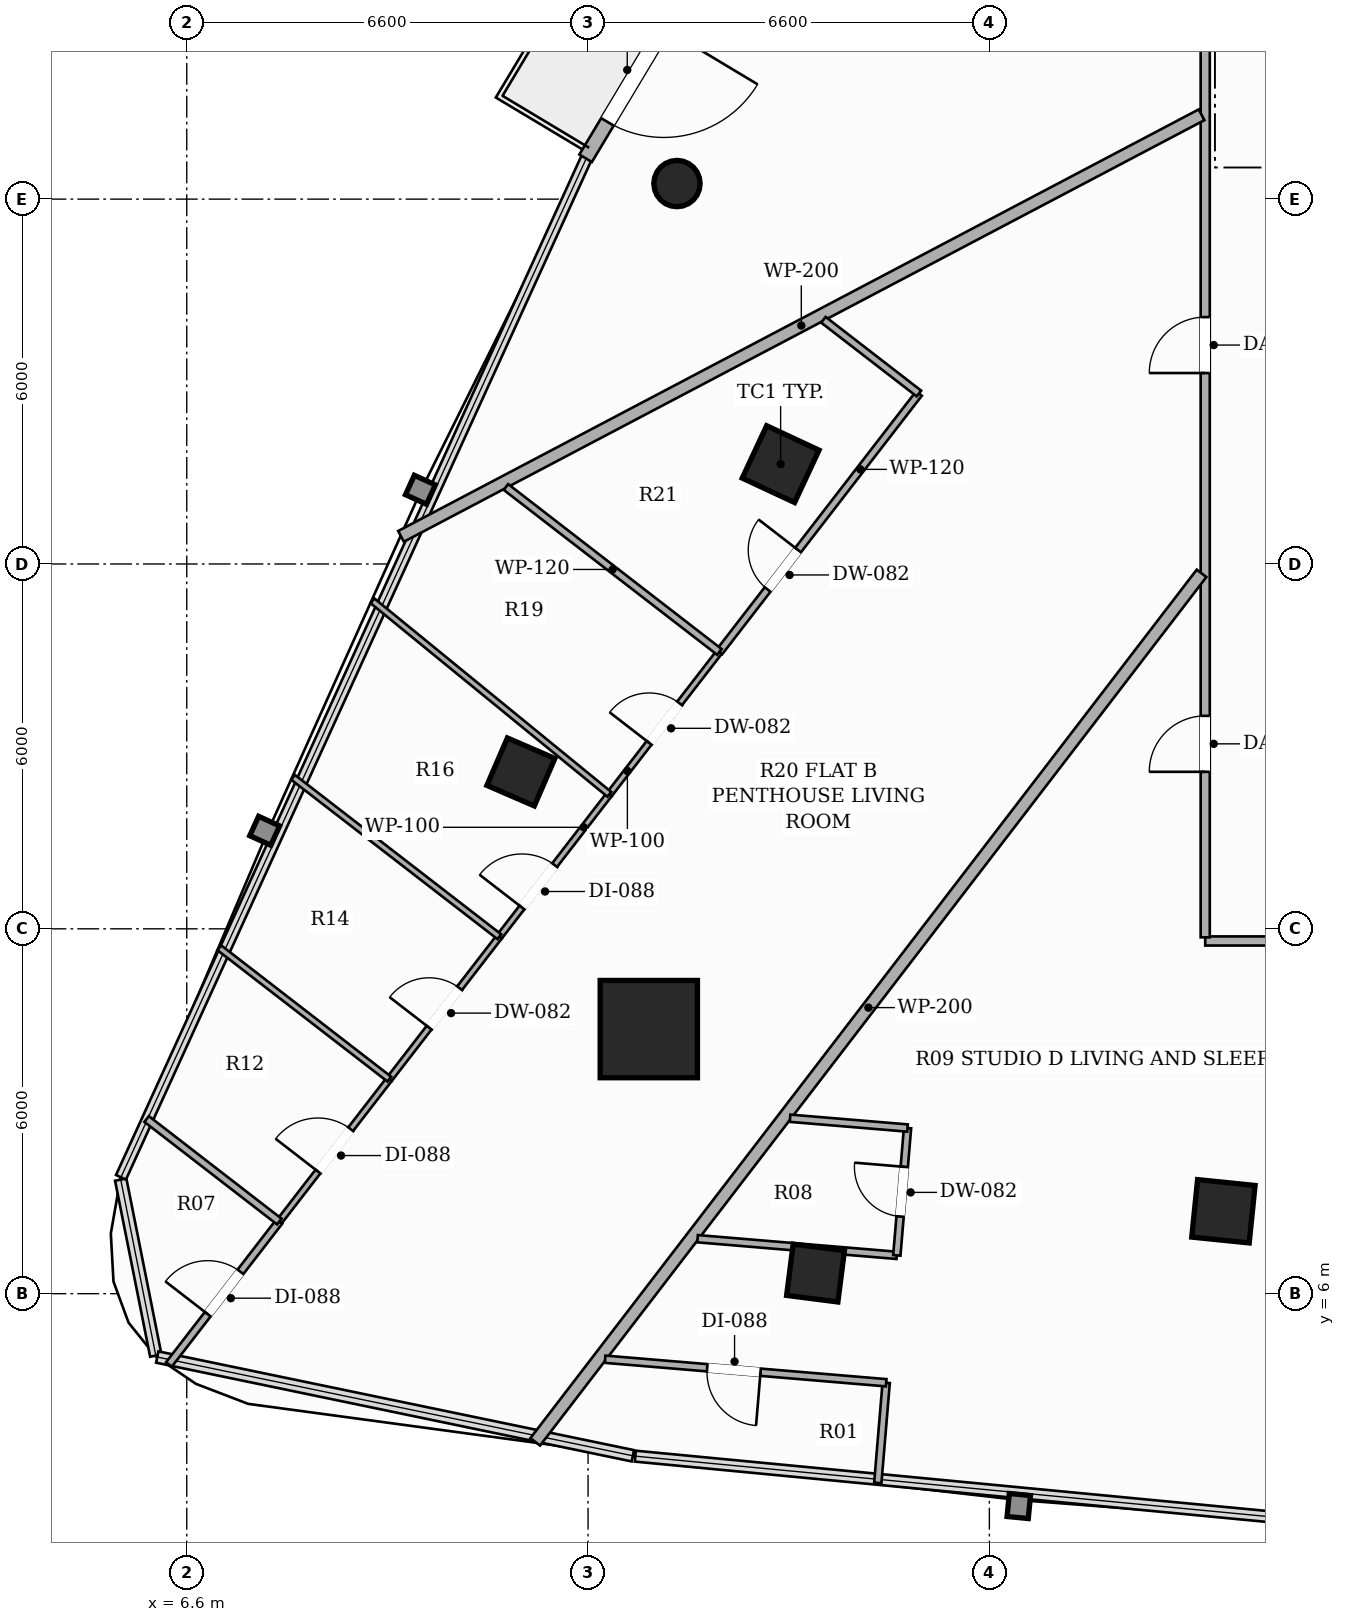
"""IFC4 building model, lengths in metres.
Left out: names, types, materials, properties, quantities, classifications, styles, units other than length and angle.
Written with IfcOpenShell. Run it as: python <this file> out.ifc"""

import sys

from ifc_helpers import new_model, si_unit, direction, frame, frame_2d, origin, origin_2d, place, context, subcontext, project, spatial, rectangle, hollow_rectangle, hollow_circle, extrude, element, fill, save


model = new_model("IFC4")
c1 = context("Model", 3, precision=1e-05, world=origin(), true_north=direction((0.0, 1.0)))
c2 = subcontext(c1, "Body", "Model", "MODEL_VIEW")
j1 = project(units=[si_unit("LENGTHUNIT", "METRE"), si_unit("PLANEANGLEUNIT", "RADIAN")], contexts=[c1])
p1 = place(None, origin())
s1 = spatial("IfcSite", under=j1, at=p1, CompositionType="ELEMENT")
p2 = place(p1, origin())
s2 = spatial("IfcBuilding", under=s1, at=p2, CompositionType="ELEMENT")
p3 = place(p2, frame((0.0, 0.0, 77.45)))
s3 = spatial("IfcBuildingStorey", under=s2, at=p3, CompositionType="ELEMENT", Elevation=77.45)
p4 = place(p3, frame((14.199, 10.351, 0.0), z_axis=(0.0, 0.0, 1.0), x_axis=(1.0, 0.0, 0.0)))
e1 = element("IfcColumn", 1, at=p4, inside=s3, PredefinedType="COLUMN", context=c2, shape_type="SweptSolid", body=[
    extrude(hollow_rectangle(XDim=1.6, YDim=1.6, WallThickness=0.05, at=origin_2d()), origin(), (0.0, 0.0, 1.0), 3.3),
])
for number, where, z_axis, x_axis in (
    (2, (16.367, 19.642, 0.0), (0.0, 0.0, 1.0), (0.423, 0.906, 0.0)),
    (3, (23.649, 7.355, 0.0), (0.0, 0.0, 1.0), (-0.995, 0.101, 0.0)),
):
    element("IfcColumn", number, at=place(p3, frame(where, z_axis=z_axis, x_axis=x_axis)), inside=s3, PredefinedType="COLUMN", context=c2, shape_type="SweptSolid", body=[
        extrude(hollow_rectangle(XDim=0.95, YDim=0.95, WallThickness=0.032, at=origin_2d()), origin(), (0.0, 0.0, 1.0), 3.3),
    ])
for number, where, z_axis, x_axis in (
    (4, (12.095, 14.58, 0.0), (0.0, 0.0, 1.0), (0.397, 0.918, 0.0)),
    (5, (16.941, 6.339, 0.0), (0.0, 0.0, 1.0), (-0.992, 0.127, 0.0)),
):
    element("IfcColumn", number, at=place(p3, frame(where, z_axis=z_axis, x_axis=x_axis)), inside=s3, PredefinedType="COLUMN", context=c2, shape_type="SweptSolid", body=[
        extrude(hollow_rectangle(XDim=0.85, YDim=0.85, WallThickness=0.028, at=origin_2d()), origin(), (0.0, 0.0, 1.0), 3.3),
    ])
p5 = place(p3, frame((14.662, 24.256, 0.0), z_axis=(0.0, 0.0, 1.0), x_axis=(1.0, 0.0, 0.0)))
e6 = element("IfcColumn", 6, at=p5, inside=s3, PredefinedType="COLUMN", context=c2, shape_type="SweptSolid", body=[
    extrude(hollow_circle(Radius=0.381, WallThickness=0.022, at=origin_2d()), origin(), (0.0, 0.0, 1.0), 3.3),
])
p6 = place(p3, frame((19.576, 35.37, 0.0), z_axis=(0.0, 0.0, 1.0), x_axis=(-0.514331693128, -0.85759134175, 0.0)))
e7 = element("IfcWall", 7, at=p6, inside=s3, PredefinedType="SOLIDWALL", context=c2, shape_type="SweptSolid", body=[
    extrude(rectangle(XDim=12.474, YDim=0.24, at=frame_2d((6.237, 0.0))), origin(), (0.0, 0.0, 1.0), 2.624),
])
p7 = place(p6, frame((9.977, 0.0, 0.0)))
e8 = element("IfcOpeningElement", 8, at=p7, cuts=e7, PredefinedType="OPENING", context=c2, shape_type="SweptSolid", body=[
    extrude(rectangle(XDim=1.8, YDim=2.2, at=frame_2d((0.9, 1.1))), frame((0.0, 0.13, 0.0), z_axis=(0.0, -1.0, 0.0), x_axis=(1.0, 0.0, 0.0)), (0.0, 0.0, 1.0), 0.26),
])
p8 = place(p3, frame((42.59, 11.8, 0.0), z_axis=(0.0, 0.0, 1.0), x_axis=(-1.0, 0.0, 0.0)))
e9 = element("IfcWall", 9, at=p8, inside=s3, PredefinedType="PARTITIONING", context=c2, shape_type="SweptSolid", body=[
    extrude(rectangle(XDim=19.24, YDim=0.15, at=frame_2d((9.62, 0.0))), origin(), (0.0, 0.0, 1.0), 2.669),
])
p9 = place(p8, frame((9.24, 0.0, 0.0)))
e10 = element("IfcOpeningElement", 10, at=p9, cuts=e9, PredefinedType="OPENING", context=c2, shape_type="SweptSolid", body=[
    extrude(rectangle(XDim=0.88, YDim=2.1, at=frame_2d((0.44, 1.05))), frame((0.0, 0.085, 0.0), z_axis=(0.0, -1.0, 0.0), x_axis=(1.0, 0.0, 0.0)), (0.0, 0.0, 1.0), 0.17),
])
p10 = place(p8, frame((2.174, 0.0, 0.0)))
e11 = element("IfcOpeningElement", 11, at=p10, cuts=e9, PredefinedType="OPENING", context=c2, shape_type="SweptSolid", body=[
    extrude(rectangle(XDim=0.88, YDim=2.1, at=frame_2d((0.44, 1.05))), frame((0.0, 0.085, 0.0), z_axis=(0.0, -1.0, 0.0), x_axis=(1.0, 0.0, 0.0)), (0.0, 0.0, 1.0), 0.17),
])
p11 = place(p3, frame((23.35, 11.86, 0.0), z_axis=(0.0, 0.0, 1.0), x_axis=(0.0, 1.0, 0.0)))
e12 = element("IfcWall", 12, at=p11, inside=s3, PredefinedType="PARTITIONING", context=c2, shape_type="SweptSolid", body=[
    extrude(rectangle(XDim=25.04, YDim=0.15, at=frame_2d((12.52, 0.0))), origin(), (0.0, 0.0, 1.0), 2.413),
])
p12 = place(p11, frame((18.695, 0.0, 0.0)))
e13 = element("IfcOpeningElement", 13, at=p12, cuts=e12, PredefinedType="OPENING", context=c2, shape_type="SweptSolid", body=[
    extrude(rectangle(XDim=0.88, YDim=2.1, at=frame_2d((0.44, 1.05))), frame((0.0, 0.085, 0.0), z_axis=(0.0, -1.0, 0.0), x_axis=(1.0, 0.0, 0.0)), (0.0, 0.0, 1.0), 0.17),
])
p13 = place(p11, frame((9.28, 0.0, 0.0)))
e14 = element("IfcOpeningElement", 14, at=p13, cuts=e12, PredefinedType="OPENING", context=c2, shape_type="SweptSolid", body=[
    extrude(rectangle(XDim=0.92, YDim=2.15, at=frame_2d((0.46, 1.075))), frame((0.0, 0.085, 0.0), z_axis=(0.0, -1.0, 0.0), x_axis=(1.0, 0.0, 0.0)), (0.0, 0.0, 1.0), 0.17),
])
p14 = place(p11, frame((2.722, 0.0, 0.0)))
e15 = element("IfcOpeningElement", 15, at=p14, cuts=e12, PredefinedType="OPENING", context=c2, shape_type="SweptSolid", body=[
    extrude(rectangle(XDim=0.92, YDim=2.15, at=frame_2d((0.46, 1.075))), frame((0.0, 0.085, 0.0), z_axis=(0.0, -1.0, 0.0), x_axis=(1.0, 0.0, 0.0)), (0.0, 0.0, 1.0), 0.17),
])
p15 = place(p3, frame((23.29, 25.387, 0.0), z_axis=(0.0, 0.0, 1.0), x_axis=(-0.884824599801, -0.465924272373, 0.0)))
e16 = element("IfcWall", 16, at=p15, inside=s3, PredefinedType="PARTITIONING", context=c2, shape_type="SweptSolid", body=[
    extrude(rectangle(XDim=14.88, YDim=0.2, at=frame_2d((7.44, 0.0))), origin(), (0.0, 0.0, 1.0), 2.413),
])
p16 = place(p3, frame((23.29, 17.846, 0.0), z_axis=(0.0, 0.0, 1.0), x_axis=(-0.608736412859, -0.793372535232, 0.0)))
e17 = element("IfcWall", 17, at=p16, inside=s3, PredefinedType="PARTITIONING", context=c2, shape_type="SweptSolid", body=[
    extrude(rectangle(XDim=18.003, YDim=0.2, at=frame_2d((9.001, 0.0))), origin(), (0.0, 0.0, 1.0), 2.413),
])
p17 = place(p3, frame((15.36, 16.554, 0.0), z_axis=(0.0, 0.0, 1.0), x_axis=(0.611289599194, 0.791406991324, 0.0)))
e18 = element("IfcWall", 18, at=p17, inside=s3, PredefinedType="PARTITIONING", context=c2, shape_type="SweptSolid", body=[
    extrude(rectangle(XDim=5.369, YDim=0.12, at=frame_2d((2.685, 0.0))), origin(), (0.0, 0.0, 1.0), 2.669),
])
p18 = place(p17, frame((1.297, 0.0, 0.0)))
e19 = element("IfcOpeningElement", 19, at=p18, cuts=e18, PredefinedType="OPENING", context=c2, shape_type="SweptSolid", body=[
    extrude(rectangle(XDim=0.82, YDim=2.1, at=frame_2d((0.41, 1.05))), frame((0.0, 0.07, 0.0), z_axis=(0.0, -1.0, 0.0), x_axis=(1.0, 0.0, 0.0)), (0.0, 0.0, 1.0), 0.14),
])
p19 = place(p3, frame((18.642, 20.803, 0.0), z_axis=(0.0, 0.0, 1.0), x_axis=(-0.791493240875, 0.611177919799, 0.0)))
e20 = element("IfcWall", 20, at=p19, inside=s3, PredefinedType="PARTITIONING", context=c2, shape_type="SweptSolid", body=[
    extrude(rectangle(XDim=1.985, YDim=0.12, at=frame_2d((0.992, 0.0))), origin(), (0.0, 0.0, 1.0), 2.669),
])
p20 = place(p3, frame((6.307, 4.836, 0.0), z_axis=(0.0, 0.0, 1.0), x_axis=(0.611279012709, 0.791415168304, 0.0)))
e21 = element("IfcWall", 21, at=p20, inside=s3, PredefinedType="PARTITIONING", context=c2, shape_type="SweptSolid", body=[
    extrude(rectangle(XDim=2.969, YDim=0.12, at=frame_2d((1.485, 0.0))), origin(), (0.0, 0.0, 1.0), 3.06),
])
p21 = place(p20, frame((1.045, 0.0, 0.0)))
e22 = element("IfcOpeningElement", 22, at=p21, cuts=e21, PredefinedType="OPENING", context=c2, shape_type="SweptSolid", body=[
    extrude(rectangle(XDim=0.88, YDim=2.1, at=frame_2d((0.44, 1.05))), frame((0.0, 0.07, 0.0), z_axis=(0.0, -1.0, 0.0), x_axis=(1.0, 0.0, 0.0)), (0.0, 0.0, 1.0), 0.14),
])
p22 = place(p3, frame((11.741, 11.87, 0.0), z_axis=(0.0, 0.0, 1.0), x_axis=(0.61134418085, 0.791364828976, 0.0)))
e23 = element("IfcWall", 23, at=p22, inside=s3, PredefinedType="PARTITIONING", context=c2, shape_type="SweptSolid", body=[
    extrude(rectangle(XDim=2.959, YDim=0.1, at=frame_2d((1.479, 0.0))), origin(), (0.0, 0.0, 1.0), 2.413),
])
p23 = place(p22, frame((0.608, 0.0, 0.0)))
e24 = element("IfcOpeningElement", 24, at=p23, cuts=e23, PredefinedType="OPENING", context=c2, shape_type="SweptSolid", body=[
    extrude(rectangle(XDim=0.88, YDim=2.1, at=frame_2d((0.44, 1.05))), frame((0.0, 0.06, 0.0), z_axis=(0.0, -1.0, 0.0), x_axis=(1.0, 0.0, 0.0)), (0.0, 0.0, 1.0), 0.12),
])
p24 = place(p3, frame((13.55, 14.212, 0.0), z_axis=(0.0, 0.0, 1.0), x_axis=(0.611510880037, 0.791236022686, 0.0)))
e25 = element("IfcWall", 25, at=p24, inside=s3, PredefinedType="PARTITIONING", context=c2, shape_type="SweptSolid", body=[
    extrude(rectangle(XDim=2.96, YDim=0.1, at=frame_2d((1.48, 0.0))), origin(), (0.0, 0.0, 1.0), 3.06),
])
p25 = place(p24, frame((1.07, 0.0, 0.0)))
e26 = element("IfcOpeningElement", 26, at=p25, cuts=e25, PredefinedType="OPENING", context=c2, shape_type="SweptSolid", body=[
    extrude(rectangle(XDim=0.82, YDim=2.1, at=frame_2d((0.41, 1.05))), frame((0.0, 0.06, 0.0), z_axis=(0.0, -1.0, 0.0), x_axis=(1.0, 0.0, 0.0)), (0.0, 0.0, 1.0), 0.12),
])
p26 = place(p3, frame((9.932, 9.528, 0.0), z_axis=(0.0, 0.0, 1.0), x_axis=(0.611304268233, 0.791395660615, 0.0)))
e27 = element("IfcWall", 27, at=p26, inside=s3, PredefinedType="PARTITIONING", context=c2, shape_type="SweptSolid", body=[
    extrude(rectangle(XDim=2.959, YDim=0.1, at=frame_2d((1.48, 0.0))), origin(), (0.0, 0.0, 1.0), 2.619),
])
p27 = place(p26, frame((1.07, 0.0, 0.0)))
e28 = element("IfcOpeningElement", 28, at=p27, cuts=e27, PredefinedType="OPENING", context=c2, shape_type="SweptSolid", body=[
    extrude(rectangle(XDim=0.82, YDim=2.1, at=frame_2d((0.41, 1.05))), frame((0.0, 0.06, 0.0), z_axis=(0.0, -1.0, 0.0), x_axis=(1.0, 0.0, 0.0)), (0.0, 0.0, 1.0), 0.12),
])
p28 = place(p3, frame((8.122, 7.186, 0.0), z_axis=(0.0, 0.0, 1.0), x_axis=(0.611459238808, 0.791275931187, 0.0)))
e29 = element("IfcWall", 29, at=p28, inside=s3, PredefinedType="PARTITIONING", context=c2, shape_type="SweptSolid", body=[
    extrude(rectangle(XDim=2.96, YDim=0.1, at=frame_2d((1.48, 0.0))), origin(), (0.0, 0.0, 1.0), 3.06),
])
p29 = place(p28, frame((1.04, 0.0, 0.0)))
e30 = element("IfcOpeningElement", 30, at=p29, cuts=e29, PredefinedType="OPENING", context=c2, shape_type="SweptSolid", body=[
    extrude(rectangle(XDim=0.88, YDim=2.1, at=frame_2d((0.44, 1.05))), frame((0.0, 0.06, 0.0), z_axis=(0.0, -1.0, 0.0), x_axis=(1.0, 0.0, 0.0)), (0.0, 0.0, 1.0), 0.12),
])
p30 = place(p3, frame((15.36, 16.554, 0.0), z_axis=(0.0, 0.0, 1.0), x_axis=(-0.79138059941, 0.611323766, 0.0)))
e31 = element("IfcWall", 31, at=p30, inside=s3, PredefinedType="PARTITIONING", context=c2, shape_type="SweptSolid", body=[
    extrude(rectangle(XDim=4.437, YDim=0.12, at=frame_2d((2.218, 0.0))), origin(), (0.0, 0.0, 1.0), 2.413),
])
p31 = place(p3, frame((5.94, 8.872, 0.0), z_axis=(0.0, 0.0, 1.0), x_axis=(0.791312259297, -0.611412224514, 0.0)))
e32 = element("IfcWall", 32, at=p31, inside=s3, PredefinedType="PARTITIONING", context=c2, shape_type="SweptSolid", body=[
    extrude(rectangle(XDim=2.758, YDim=0.12, at=frame_2d((1.379, 0.0))), origin(), (0.0, 0.0, 1.0), 3.06),
])
p32 = place(p3, frame((9.654, 17.394, 0.0), z_axis=(0.0, 0.0, 1.0), x_axis=(0.774493289837, -0.63258212431, 0.0)))
e33 = element("IfcWall", 33, at=p32, inside=s3, PredefinedType="PARTITIONING", context=c2, shape_type="SweptSolid", body=[
    extrude(rectangle(XDim=5.03, YDim=0.1, at=frame_2d((2.515, 0.0))), origin(), (0.0, 0.0, 1.0), 2.413),
])
p33 = place(p3, frame((11.741, 11.87, 0.0), z_axis=(0.0, 0.0, 1.0), x_axis=(-0.791298779838, 0.61142966973, 0.0)))
e34 = element("IfcWall", 34, at=p33, inside=s3, PredefinedType="PARTITIONING", context=c2, shape_type="SweptSolid", body=[
    extrude(rectangle(XDim=4.286, YDim=0.1, at=frame_2d((2.143, 0.0))), origin(), (0.0, 0.0, 1.0), 3.06),
])
p34 = place(p3, frame((9.932, 9.528, 0.0), z_axis=(0.0, 0.0, 1.0), x_axis=(-0.791360981132, 0.611349161725, 0.0)))
e35 = element("IfcWall", 35, at=p34, inside=s3, PredefinedType="PARTITIONING", context=c2, shape_type="SweptSolid", body=[
    extrude(rectangle(XDim=3.533, YDim=0.1, at=frame_2d((1.767, 0.0))), origin(), (0.0, 0.0, 1.0), 3.06),
])
p35 = place(p3, frame((15.001, 6.904, 0.0), z_axis=(0.0, 0.0, 1.0), x_axis=(0.996518569178, -0.083371105803, 0.0)))
e36 = element("IfcWall", 36, at=p35, inside=s3, PredefinedType="PARTITIONING", context=c2, shape_type="SweptSolid", body=[
    extrude(rectangle(XDim=3.289, YDim=0.12, at=frame_2d((1.644, 0.0))), origin(), (0.0, 0.0, 1.0), 2.413),
])
p36 = place(p3, frame((18.278, 6.63, 0.0), z_axis=(0.0, 0.0, 1.0), x_axis=(0.083756885487, 0.996486218737, 0.0)))
e37 = element("IfcWall", 37, at=p36, inside=s3, PredefinedType="PARTITIONING", context=c2, shape_type="SweptSolid", body=[
    extrude(rectangle(XDim=2.102, YDim=0.12, at=frame_2d((1.051, 0.0))), origin(), (0.0, 0.0, 1.0), 2.413),
])
p37 = place(p36, frame((0.641, 0.0, 0.0)))
e38 = element("IfcOpeningElement", 38, at=p37, cuts=e37, PredefinedType="OPENING", context=c2, shape_type="SweptSolid", body=[
    extrude(rectangle(XDim=0.82, YDim=2.1, at=frame_2d((0.41, 1.05))), frame((0.0, 0.07, 0.0), z_axis=(0.0, -1.0, 0.0), x_axis=(1.0, 0.0, 0.0)), (0.0, 0.0, 1.0), 0.14),
])
p38 = place(p3, frame((18.454, 8.724, 0.0), z_axis=(0.0, 0.0, 1.0), x_axis=(-0.996550966871, 0.082982952637, 0.0)))
e39 = element("IfcWall", 39, at=p38, inside=s3, PredefinedType="PARTITIONING", context=c2, shape_type="SweptSolid", body=[
    extrude(rectangle(XDim=1.939, YDim=0.12, at=frame_2d((0.969, 0.0))), origin(), (0.0, 0.0, 1.0), 2.669),
])
p39 = place(p3, frame((17.965, 2.887, 0.0), z_axis=(0.0, 0.0, 1.0), x_axis=(0.083412008543, 0.996515146313, 0.0)))
e40 = element("IfcWall", 40, at=p39, inside=s3, PredefinedType="PARTITIONING", context=c2, shape_type="SweptSolid", body=[
    extrude(rectangle(XDim=1.654, YDim=0.12, at=frame_2d((0.827, 0.0))), origin(), (0.0, 0.0, 1.0), 2.619),
])
p40 = place(p3, frame((18.103, 4.535, 0.0), z_axis=(0.0, 0.0, 1.0), x_axis=(-0.99650936218, 0.083481082211, 0.0)))
e41 = element("IfcWall", 41, at=p40, inside=s3, PredefinedType="PARTITIONING", context=c2, shape_type="SweptSolid", body=[
    extrude(rectangle(XDim=4.638, YDim=0.12, at=frame_2d((2.319, 0.0))), origin(), (0.0, 0.0, 1.0), 2.619),
])
p41 = place(p40, frame((2.074, 0.0, 0.0)))
e42 = element("IfcOpeningElement", 42, at=p41, cuts=e41, PredefinedType="OPENING", context=c2, shape_type="SweptSolid", body=[
    extrude(rectangle(XDim=0.88, YDim=2.1, at=frame_2d((0.44, 1.05))), frame((0.0, 0.07, 0.0), z_axis=(0.0, -1.0, 0.0), x_axis=(1.0, 0.0, 0.0)), (0.0, 0.0, 1.0), 0.14),
])
p42 = place(p7, origin())
e43 = element("IfcDoor", 43, at=p42, inside=s3, OperationType="SINGLE_SWING_LEFT", PredefinedType="DOOR", context=c2, shape_type="SweptSolid", body=[
    extrude(rectangle(XDim=1.8, YDim=2.2, at=frame_2d((0.9, 1.1))), frame((0.0, 0.025, 0.0), z_axis=(0.0, -1.0, 0.0), x_axis=(1.0, 0.0, 0.0)), (0.0, 0.0, 1.0), 0.05),
])
fill(e8, e43)
p43 = place(p13, origin())
e44 = element("IfcDoor", 44, at=p43, inside=s3, OperationType="SINGLE_SWING_LEFT", PredefinedType="DOOR", context=c2, shape_type="SweptSolid", body=[
    extrude(rectangle(XDim=0.92, YDim=2.15, at=frame_2d((0.46, 1.075))), frame((0.0, 0.025, 0.0), z_axis=(0.0, -1.0, 0.0), x_axis=(1.0, 0.0, 0.0)), (0.0, 0.0, 1.0), 0.05),
])
fill(e14, e44)
p44 = place(p18, origin())
e45 = element("IfcDoor", 45, at=p44, inside=s3, OperationType="SINGLE_SWING_RIGHT", PredefinedType="DOOR", context=c2, shape_type="SweptSolid", body=[
    extrude(rectangle(XDim=0.82, YDim=2.1, at=frame_2d((0.41, 1.05))), frame((0.0, 0.025, 0.0), z_axis=(0.0, -1.0, 0.0), x_axis=(1.0, 0.0, 0.0)), (0.0, 0.0, 1.0), 0.05),
])
fill(e19, e45)
p45 = place(p21, origin())
e46 = element("IfcDoor", 46, at=p45, inside=s3, OperationType="SINGLE_SWING_LEFT", PredefinedType="DOOR", context=c2, shape_type="SweptSolid", body=[
    extrude(rectangle(XDim=0.88, YDim=2.1, at=frame_2d((0.44, 1.05))), frame((0.0, 0.025, 0.0), z_axis=(0.0, -1.0, 0.0), x_axis=(1.0, 0.0, 0.0)), (0.0, 0.0, 1.0), 0.05),
])
fill(e22, e46)
p46 = place(p23, origin())
e47 = element("IfcDoor", 47, at=p46, inside=s3, OperationType="SINGLE_SWING_LEFT", PredefinedType="DOOR", context=c2, shape_type="SweptSolid", body=[
    extrude(rectangle(XDim=0.88, YDim=2.1, at=frame_2d((0.44, 1.05))), frame((0.0, 0.025, 0.0), z_axis=(0.0, -1.0, 0.0), x_axis=(1.0, 0.0, 0.0)), (0.0, 0.0, 1.0), 0.05),
])
fill(e24, e47)
p47 = place(p25, origin())
e48 = element("IfcDoor", 48, at=p47, inside=s3, OperationType="SINGLE_SWING_LEFT", PredefinedType="DOOR", context=c2, shape_type="SweptSolid", body=[
    extrude(rectangle(XDim=0.82, YDim=2.1, at=frame_2d((0.41, 1.05))), frame((0.0, 0.025, 0.0), z_axis=(0.0, -1.0, 0.0), x_axis=(1.0, 0.0, 0.0)), (0.0, 0.0, 1.0), 0.05),
])
fill(e26, e48)
p48 = place(p27, origin())
e49 = element("IfcDoor", 49, at=p48, inside=s3, OperationType="SINGLE_SWING_LEFT", PredefinedType="DOOR", context=c2, shape_type="SweptSolid", body=[
    extrude(rectangle(XDim=0.82, YDim=2.1, at=frame_2d((0.41, 1.05))), frame((0.0, 0.025, 0.0), z_axis=(0.0, -1.0, 0.0), x_axis=(1.0, 0.0, 0.0)), (0.0, 0.0, 1.0), 0.05),
])
fill(e28, e49)
p49 = place(p29, origin())
e50 = element("IfcDoor", 50, at=p49, inside=s3, OperationType="SINGLE_SWING_LEFT", PredefinedType="DOOR", context=c2, shape_type="SweptSolid", body=[
    extrude(rectangle(XDim=0.88, YDim=2.1, at=frame_2d((0.44, 1.05))), frame((0.0, 0.025, 0.0), z_axis=(0.0, -1.0, 0.0), x_axis=(1.0, 0.0, 0.0)), (0.0, 0.0, 1.0), 0.05),
])
fill(e30, e50)
p50 = place(p14, origin())
e51 = element("IfcDoor", 51, at=p50, inside=s3, OperationType="SINGLE_SWING_LEFT", PredefinedType="DOOR", context=c2, shape_type="SweptSolid", body=[
    extrude(rectangle(XDim=0.92, YDim=2.15, at=frame_2d((0.46, 1.075))), frame((0.0, 0.025, 0.0), z_axis=(0.0, -1.0, 0.0), x_axis=(1.0, 0.0, 0.0)), (0.0, 0.0, 1.0), 0.05),
])
fill(e15, e51)
p51 = place(p37, origin())
e52 = element("IfcDoor", 52, at=p51, inside=s3, OperationType="SINGLE_SWING_RIGHT", PredefinedType="DOOR", context=c2, shape_type="SweptSolid", body=[
    extrude(rectangle(XDim=0.82, YDim=2.1, at=frame_2d((0.41, 1.05))), frame((0.0, 0.025, 0.0), z_axis=(0.0, -1.0, 0.0), x_axis=(1.0, 0.0, 0.0)), (0.0, 0.0, 1.0), 0.05),
])
fill(e38, e52)
p52 = place(p41, origin())
e53 = element("IfcDoor", 53, at=p52, inside=s3, OperationType="SINGLE_SWING_LEFT", PredefinedType="DOOR", context=c2, shape_type="SweptSolid", body=[
    extrude(rectangle(XDim=0.88, YDim=2.1, at=frame_2d((0.44, 1.05))), frame((0.0, 0.025, 0.0), z_axis=(0.0, -1.0, 0.0), x_axis=(1.0, 0.0, 0.0)), (0.0, 0.0, 1.0), 0.05),
])
fill(e42, e53)
save(model, sys.argv[1])
